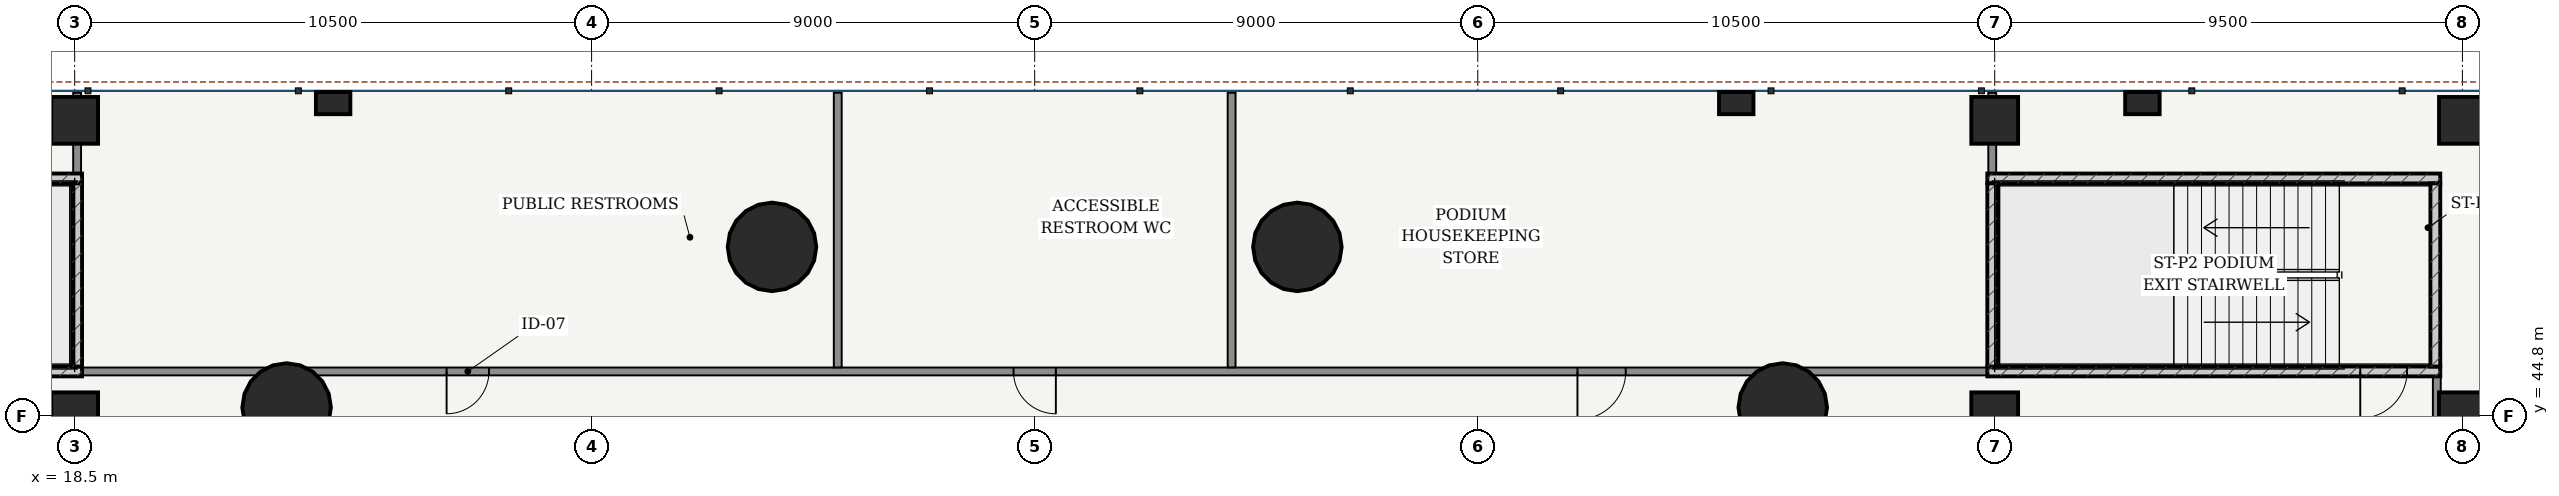
"""IFC4 building model, lengths in metres.
Left out: names, types, materials, properties, quantities, classifications, styles, units other than length and angle.
Written with IfcOpenShell. Run it as: python <this file> out.ifc"""

import sys

from ifc_helpers import new_model, si_unit, direction, frame, frame_2d, origin, origin_2d, place, context, subcontext, project, spatial, rectangle, hollow_circle, extrude, source, transform, mapped, element, fill, save


model = new_model("IFC4")
c1 = context("Model", 3, precision=1e-05, world=origin(), true_north=direction((-0.2419218956, 0.970295726276)))
c2 = subcontext(c1, "Body", "Model", "MODEL_VIEW")
j1 = project(units=[si_unit("LENGTHUNIT", "METRE"), si_unit("PLANEANGLEUNIT", "RADIAN")], contexts=[c1])
p1 = place(None, origin())
s1 = spatial("IfcSite", under=j1, at=p1, CompositionType="ELEMENT")
p2 = place(p1, origin())
s2 = spatial("IfcBuilding", under=s1, at=p2, CompositionType="ELEMENT")
p3 = place(p2, frame((0.0, 0.0, 9.9)))
s3 = spatial("IfcBuildingStorey", under=s2, at=p3, CompositionType="ELEMENT", Elevation=9.9)
p4 = place(p3, frame((9.45, 45.7, 0.0), z_axis=(0.0, 0.0, 1.0), x_axis=(1.0, 0.0, 0.0)))
e1 = element("IfcWall", 1, at=p4, inside=s3, PredefinedType="SOLIDWALL", context=c2, shape_type="SweptSolid", body=[
    extrude(rectangle(XDim=9.2, YDim=0.2, at=frame_2d((4.6, 0.0))), origin(), (0.0, 0.0, 1.0), 4.2),
])
p5 = place(p4, frame((0.675, 0.0, 0.0)))
e2 = element("IfcOpeningElement", 2, at=p5, cuts=e1, PredefinedType="OPENING", context=c2, shape_type="SweptSolid", body=[
    extrude(rectangle(XDim=0.95, YDim=2.15, at=frame_2d((0.475, 1.075))), frame((0.0, 0.11, 0.0), z_axis=(0.0, -1.0, 0.0), x_axis=(1.0, 0.0, 0.0)), (0.0, 0.0, 1.0), 0.22),
])
p6 = place(p3, frame((9.45, 49.62, 0.0), z_axis=(0.0, 0.0, 1.0), x_axis=(1.0, 0.0, 0.0)))
e3 = element("IfcWall", 3, at=p6, inside=s3, PredefinedType="SOLIDWALL", context=c2, shape_type="SweptSolid", body=[
    extrude(rectangle(XDim=9.2, YDim=0.2, at=frame_2d((4.6, 0.0))), origin(), (0.0, 0.0, 1.0), 4.2),
])
p7 = place(p3, frame((18.55, 45.8, 0.0), z_axis=(0.0, 0.0, 1.0), x_axis=(0.0, 1.0, 0.0)))
e4 = element("IfcWall", 4, at=p7, inside=s3, PredefinedType="SOLIDWALL", context=c2, shape_type="SweptSolid", body=[
    extrude(rectangle(XDim=3.72, YDim=0.2, at=frame_2d((1.86, 0.0))), origin(), (0.0, 0.0, 1.0), 4.2),
])
p8 = place(p3, frame((57.35, 45.7, 0.0), z_axis=(0.0, 0.0, 1.0), x_axis=(1.0, 0.0, 0.0)))
e5 = element("IfcWall", 5, at=p8, inside=s3, PredefinedType="SOLIDWALL", context=c2, shape_type="SweptSolid", body=[
    extrude(rectangle(XDim=9.2, YDim=0.2, at=frame_2d((4.6, 0.0))), origin(), (0.0, 0.0, 1.0), 4.2),
])
p9 = place(p8, frame((7.575, 0.0, 0.0)))
e6 = element("IfcOpeningElement", 6, at=p9, cuts=e5, PredefinedType="OPENING", context=c2, shape_type="SweptSolid", body=[
    extrude(rectangle(XDim=0.95, YDim=2.15, at=frame_2d((0.475, 1.075))), frame((0.0, 0.11, 0.0), z_axis=(0.0, -1.0, 0.0), x_axis=(1.0, 0.0, 0.0)), (0.0, 0.0, 1.0), 0.22),
])
p10 = place(p3, frame((57.35, 49.62, 0.0), z_axis=(0.0, 0.0, 1.0), x_axis=(1.0, 0.0, 0.0)))
e7 = element("IfcWall", 7, at=p10, inside=s3, PredefinedType="SOLIDWALL", context=c2, shape_type="SweptSolid", body=[
    extrude(rectangle(XDim=9.2, YDim=0.2, at=frame_2d((4.6, 0.0))), origin(), (0.0, 0.0, 1.0), 4.2),
])
for number, where, z_axis, x_axis in (
    (8, (57.45, 45.8, 0.0), (0.0, 0.0, 1.0), (0.0, 1.0, 0.0)),
    (9, (66.45, 45.8, 0.0), (0.0, 0.0, 1.0), (0.0, 1.0, 0.0)),
):
    element("IfcWall", number, at=place(p3, frame(where, z_axis=z_axis, x_axis=x_axis)), inside=s3, PredefinedType="SOLIDWALL", context=c2, shape_type="SweptSolid", body=[
        extrude(rectangle(XDim=3.72, YDim=0.2, at=frame_2d((1.86, 0.0))), origin(), (0.0, 0.0, 1.0), 4.2),
    ])
for number, where, z_axis, x_axis in (
    (10, (53.195, 44.968, 0.0), (0.0, 0.0, 1.0), (1.0, 0.0, 0.0)),
    (11, (43.336, 48.23, 0.0), (0.0, 0.0, 1.0), (1.0, 0.0, 0.0)),
    (12, (32.664, 48.23, 0.0), (0.0, 0.0, 1.0), (1.0, 0.0, 0.0)),
    (13, (22.805, 44.968, 0.0), (0.0, 0.0, 1.0), (1.0, 0.0, 0.0)),
):
    element("IfcColumn", number, at=place(p3, frame(where, z_axis=z_axis, x_axis=x_axis)), inside=s3, PredefinedType="COLUMN", context=c2, shape_type="SweptSolid", body=[
        extrude(hollow_circle(Radius=0.9, WallThickness=0.055, at=origin_2d()), origin(), (0.0, 0.0, 1.0), 4.5),
    ])
for number, where, z_axis, x_axis in (
    (14, (18.5, 44.8, 0.0), (0.0, 0.0, 1.0), (1.0, 0.0, 0.0)),
    (15, (18.5, 50.8, 0.0), (0.0, 0.0, 1.0), (1.0, 0.0, 0.0)),
    (16, (57.5, 44.8, 0.0), (0.0, 0.0, 1.0), (1.0, 0.0, 0.0)),
    (17, (57.5, 50.8, 0.0), (0.0, 0.0, 1.0), (1.0, 0.0, 0.0)),
    (18, (67.0, 44.8, 0.0), (0.0, 0.0, 1.0), (1.0, 0.0, 0.0)),
    (19, (67.0, 50.8, 0.0), (0.0, 0.0, 1.0), (1.0, 0.0, 0.0)),
):
    element("IfcColumn", number, at=place(p3, frame(where, z_axis=z_axis, x_axis=x_axis)), inside=s3, PredefinedType="COLUMN", context=c2, shape_type="SweptSolid", body=[
        extrude(rectangle(XDim=0.95, YDim=0.95, at=origin_2d()), origin(), (0.0, 0.0, 1.0), 4.5),
    ])
for number, where, z_axis, x_axis in (
    (20, (23.75, 51.15, 0.0), (0.0, 0.0, 1.0), (1.0, 0.0, 0.0)),
    (21, (52.25, 51.15, 0.0), (0.0, 0.0, 1.0), (1.0, 0.0, 0.0)),
    (22, (60.5, 51.15, 0.0), (0.0, 0.0, 1.0), (1.0, 0.0, 0.0)),
):
    element("IfcColumn", number, at=place(p3, frame(where, z_axis=z_axis, x_axis=x_axis)), inside=s3, PredefinedType="PILASTER", context=c2, shape_type="SweptSolid", body=[
        extrude(rectangle(XDim=0.7, YDim=0.45, at=origin_2d()), origin(), (0.0, 0.0, 1.0), 4.5),
    ])
p11 = place(p3, frame((66.48, 36.92, 0.0), z_axis=(0.0, 0.0, 1.0), x_axis=(0.0, 1.0, 0.0)))
e23 = element("IfcWall", 23, at=p11, inside=s3, PredefinedType="PARTITIONING", context=c2, shape_type="SweptSolid", body=[
    extrude(rectangle(XDim=8.78, YDim=0.16, at=frame_2d((4.39, 0.0))), origin(), (0.0, 0.0, 1.0), 3.569),
])
p12 = place(p3, frame((18.55, 45.7, 0.0), z_axis=(0.0, 0.0, 1.0), x_axis=(1.0, 0.0, 0.0)))
e24 = element("IfcWall", 24, at=p12, inside=s3, PredefinedType="PARTITIONING", context=c2, shape_type="SweptSolid", body=[
    extrude(rectangle(XDim=38.9, YDim=0.16, at=frame_2d((19.45, 0.0))), origin(), (0.0, 0.0, 1.0), 3.55),
])
p13 = place(p12, frame((7.505, 0.0, 0.0)))
e25 = element("IfcOpeningElement", 25, at=p13, cuts=e24, PredefinedType="OPENING", context=c2, shape_type="SweptSolid", body=[
    extrude(rectangle(XDim=0.86, YDim=2.1, at=frame_2d((0.43, 1.05))), frame((0.0, 0.09, 0.0), z_axis=(0.0, -1.0, 0.0), x_axis=(1.0, 0.0, 0.0)), (0.0, 0.0, 1.0), 0.18),
])
p14 = place(p12, frame((19.02, 0.0, 0.0)))
e26 = element("IfcOpeningElement", 26, at=p14, cuts=e24, PredefinedType="OPENING", context=c2, shape_type="SweptSolid", body=[
    extrude(rectangle(XDim=0.86, YDim=2.1, at=frame_2d((0.43, 1.05))), frame((0.0, 0.09, 0.0), z_axis=(0.0, -1.0, 0.0), x_axis=(1.0, 0.0, 0.0)), (0.0, 0.0, 1.0), 0.18),
])
p15 = place(p12, frame((30.475, 0.0, 0.0)))
e27 = element("IfcOpeningElement", 27, at=p15, cuts=e24, PredefinedType="OPENING", context=c2, shape_type="SweptSolid", body=[
    extrude(rectangle(XDim=0.98, YDim=2.2, at=frame_2d((0.49, 1.1))), frame((0.0, 0.09, 0.0), z_axis=(0.0, -1.0, 0.0), x_axis=(1.0, 0.0, 0.0)), (0.0, 0.0, 1.0), 0.18),
])
for number, where, z_axis, x_axis in (
    (28, (34.0, 45.782, 0.0), (0.0, 0.0, 1.0), (0.0, 1.0, 0.0)),
    (29, (42.0, 45.782, 0.0), (0.0, 0.0, 1.0), (0.0, 1.0, 0.0)),
):
    element("IfcWall", number, at=place(p3, frame(where, z_axis=z_axis, x_axis=x_axis)), inside=s3, PredefinedType="PARTITIONING", context=c2, shape_type="SweptSolid", body=[
        extrude(rectangle(XDim=5.578, YDim=0.16, at=frame_2d((2.789, 0.0))), origin(), (0.0, 0.0, 1.0), 3.642),
    ])
for number, where, z_axis, x_axis in (
    (30, (18.55, 49.722, 0.0), (0.0, 0.0, 1.0), (0.0, 1.0, 0.0)),
    (31, (57.45, 49.722, 0.0), (0.0, 0.0, 1.0), (0.0, 1.0, 0.0)),
):
    element("IfcWall", number, at=place(p3, frame(where, z_axis=z_axis, x_axis=x_axis)), inside=s3, PredefinedType="PARTITIONING", context=c2, shape_type="SweptSolid", body=[
        extrude(rectangle(XDim=1.638, YDim=0.16, at=frame_2d((0.819, 0.0))), origin(), (0.0, 0.0, 1.0), 3.235),
    ])
m1 = source(origin(), c2, "Body", "SweptSolid", [
    extrude(rectangle(XDim=0.95, YDim=2.15, at=frame_2d((0.475, 1.075))), frame((0.0, 0.025, 0.0), z_axis=(0.0, -1.0, 0.0), x_axis=(1.0, 0.0, 0.0)), (0.0, 0.0, 1.0), 0.05),
])
p16 = place(p9, frame((0.95, 0.0, 0.0), z_axis=(0.0, 0.0, 1.0), x_axis=(-1.0, 0.0, 0.0)))
e32 = element("IfcDoor", 32, at=p16, inside=s3, OperationType="SINGLE_SWING_RIGHT", PredefinedType="DOOR", context=c2, shape_type="MappedRepresentation", body=[
    mapped(m1, transform((0.0, 0.0, 0.0), scale=1.0)),
])
fill(e6, e32)
m2 = source(origin(), c2, "Body", "SweptSolid", [
    extrude(rectangle(XDim=0.86, YDim=2.1, at=frame_2d((0.43, 1.05))), frame((0.0, 0.025, 0.0), z_axis=(0.0, -1.0, 0.0), x_axis=(1.0, 0.0, 0.0)), (0.0, 0.0, 1.0), 0.05),
])
p17 = place(p13, frame((0.86, 0.0, 0.0), z_axis=(0.0, 0.0, 1.0), x_axis=(-1.0, 0.0, 0.0)))
e33 = element("IfcDoor", 33, at=p17, inside=s3, OperationType="SINGLE_SWING_RIGHT", PredefinedType="DOOR", context=c2, shape_type="MappedRepresentation", body=[
    mapped(m2, transform((0.0, 0.0, 0.0), scale=1.0)),
])
fill(e25, e33)
p18 = place(p14, frame((0.86, 0.0, 0.0), z_axis=(0.0, 0.0, 1.0), x_axis=(-1.0, 0.0, 0.0)))
e34 = element("IfcDoor", 34, at=p18, inside=s3, OperationType="SINGLE_SWING_LEFT", PredefinedType="DOOR", context=c2, shape_type="MappedRepresentation", body=[
    mapped(m2, transform((0.0, 0.0, 0.0), scale=1.0)),
])
fill(e26, e34)
m3 = source(origin(), c2, "Body", "SweptSolid", [
    extrude(rectangle(XDim=0.98, YDim=2.2, at=frame_2d((0.49, 1.1))), frame((0.0, 0.025, 0.0), z_axis=(0.0, -1.0, 0.0), x_axis=(1.0, 0.0, 0.0)), (0.0, 0.0, 1.0), 0.05),
])
p19 = place(p15, frame((0.98, 0.0, 0.0), z_axis=(0.0, 0.0, 1.0), x_axis=(-1.0, 0.0, 0.0)))
e35 = element("IfcDoor", 35, at=p19, inside=s3, OperationType="SINGLE_SWING_RIGHT", PredefinedType="DOOR", context=c2, shape_type="MappedRepresentation", body=[
    mapped(m3, transform((0.0, 0.0, 0.0), scale=1.0)),
])
fill(e27, e35)
save(model, sys.argv[1])
